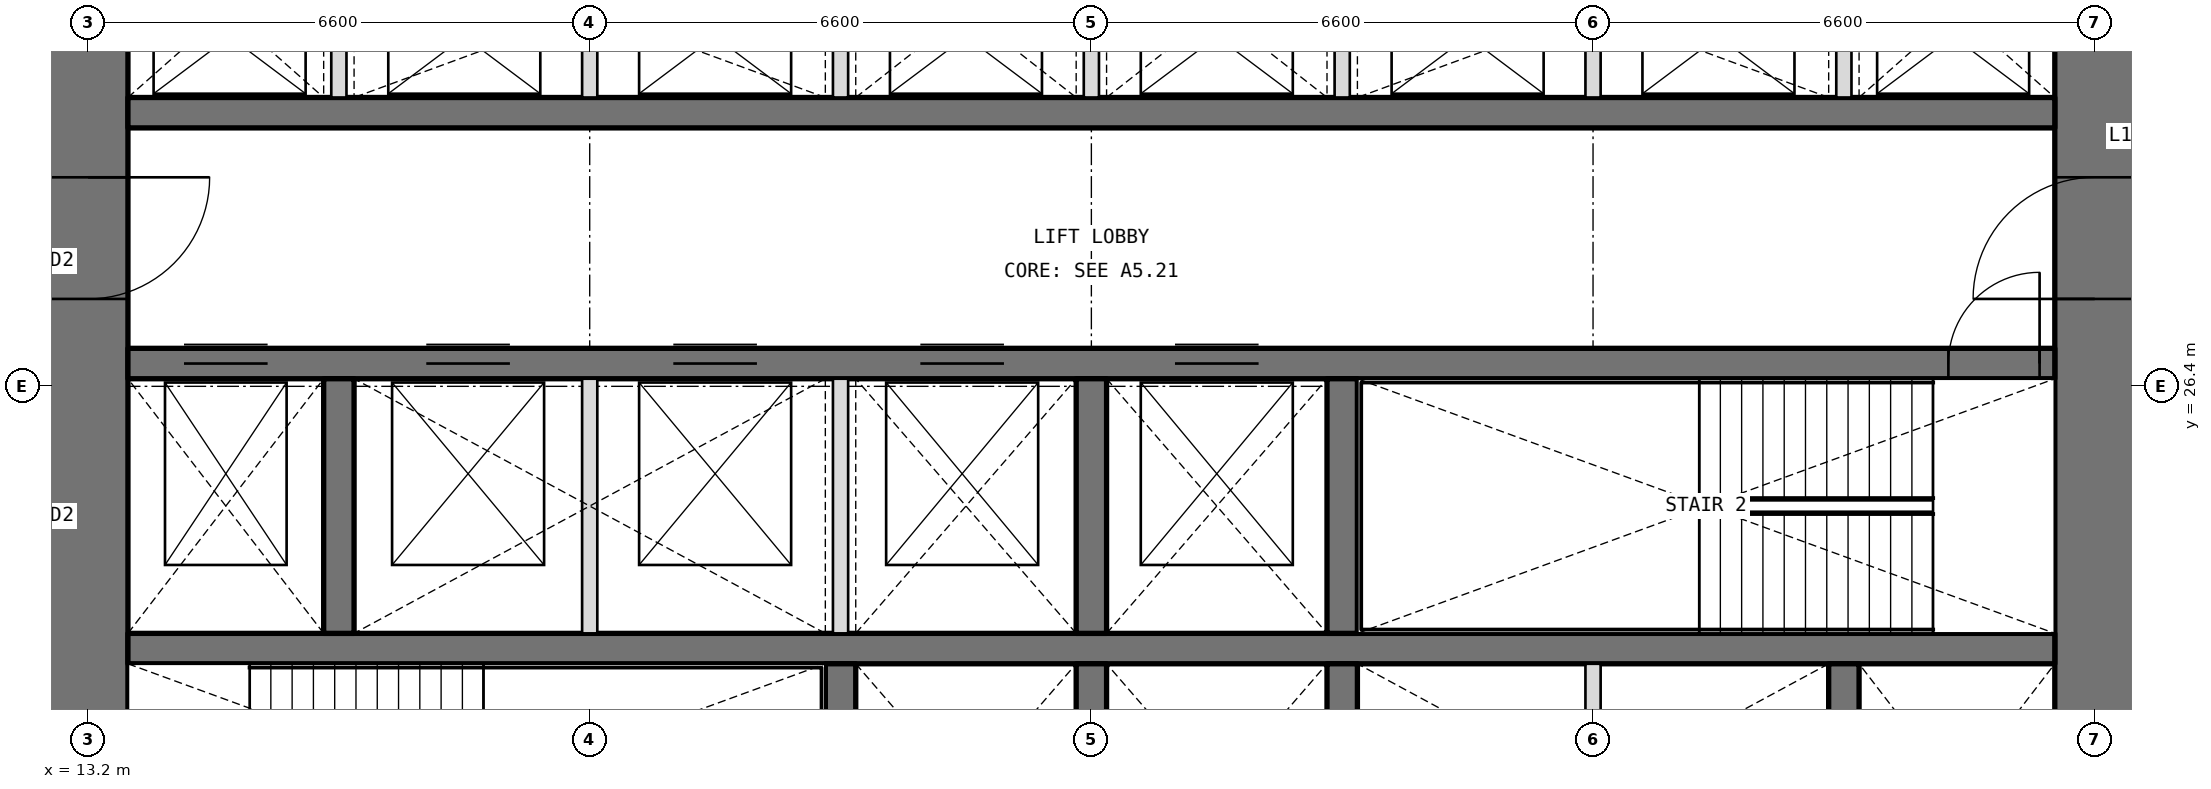
"""IFC4 building model, lengths in metres.
Left out: names, types, materials, properties, quantities, classifications, styles, units other than length and angle.
Written with IfcOpenShell. Run it as: python <this file> out.ifc"""

import sys

from ifc_helpers import new_model, si_unit, direction, frame, frame_2d, origin, place, context, subcontext, project, spatial, rectangle, extrude, element, fill, save


model = new_model("IFC4")
c1 = context("Model", 3, precision=1e-05, world=origin(), true_north=direction((0.0, 1.0)))
c2 = subcontext(c1, "Body", "Model", "MODEL_VIEW")
j1 = project(units=[si_unit("LENGTHUNIT", "METRE"), si_unit("PLANEANGLEUNIT", "RADIAN")], contexts=[c1])
p1 = place(None, origin())
s1 = spatial("IfcSite", under=j1, at=p1, CompositionType="ELEMENT")
p2 = place(p1, origin())
s2 = spatial("IfcBuilding", under=s1, at=p2, CompositionType="ELEMENT")
p3 = place(p2, frame((0.0, 0.0, 86.4)))
s3 = spatial("IfcBuildingStorey", under=s2, at=p3, CompositionType="ELEMENT", Elevation=86.4)
p4 = place(p3, frame((39.6, 13.725, 0.0), z_axis=(0.0, 0.0, 1.0), x_axis=(0.0, 1.0, 0.0)))
e1 = element("IfcWall", 1, at=p4, inside=s3, PredefinedType="SHEAR", context=c2, shape_type="SweptSolid", body=[
    extrude(rectangle(XDim=18.75, YDim=1.05, at=frame_2d((9.375, 0.0))), origin(), (0.0, 0.0, 1.0), 4.2),
])
p5 = place(p4, frame((3.025, 0.0, 0.0)))
e2 = element("IfcOpeningElement", 2, at=p5, cuts=e1, PredefinedType="OPENING", context=c2, shape_type="SweptSolid", body=[
    extrude(rectangle(XDim=1.6, YDim=2.1, at=frame_2d((0.8, 1.05))), frame((0.0, 0.535, 0.0), z_axis=(0.0, -1.0, 0.0), x_axis=(1.0, 0.0, 0.0)), (0.0, 0.0, 1.0), 1.07),
])
p6 = place(p4, frame((13.825, 0.0, 0.0)))
e3 = element("IfcOpeningElement", 3, at=p6, cuts=e1, PredefinedType="OPENING", context=c2, shape_type="SweptSolid", body=[
    extrude(rectangle(XDim=1.6, YDim=2.1, at=frame_2d((0.8, 1.05))), frame((0.0, 0.535, 0.0), z_axis=(0.0, -1.0, 0.0), x_axis=(1.0, 0.0, 0.0)), (0.0, 0.0, 1.0), 1.07),
])
p7 = place(p3, frame((13.2, 32.475, 0.0), z_axis=(0.0, 0.0, 1.0), x_axis=(0.0, -1.0, 0.0)))
e4 = element("IfcWall", 4, at=p7, inside=s3, PredefinedType="SHEAR", context=c2, shape_type="SweptSolid", body=[
    extrude(rectangle(XDim=18.75, YDim=1.05, at=frame_2d((9.375, 0.0))), origin(), (0.0, 0.0, 1.0), 4.2),
])
p8 = place(p7, frame((14.125, 0.0, 0.0)))
e5 = element("IfcOpeningElement", 5, at=p8, cuts=e4, PredefinedType="OPENING", context=c2, shape_type="SweptSolid", body=[
    extrude(rectangle(XDim=1.6, YDim=2.1, at=frame_2d((0.8, 1.05))), frame((0.0, 0.535, 0.0), z_axis=(0.0, -1.0, 0.0), x_axis=(1.0, 0.0, 0.0)), (0.0, 0.0, 1.0), 1.07),
])
p9 = place(p7, frame((3.325, 0.0, 0.0)))
e6 = element("IfcOpeningElement", 6, at=p9, cuts=e4, PredefinedType="OPENING", context=c2, shape_type="SweptSolid", body=[
    extrude(rectangle(XDim=1.6, YDim=2.1, at=frame_2d((0.8, 1.05))), frame((0.0, 0.535, 0.0), z_axis=(0.0, -1.0, 0.0), x_axis=(1.0, 0.0, 0.0)), (0.0, 0.0, 1.0), 1.07),
])
p10 = place(p3, frame((13.725, 22.95, 0.0), z_axis=(0.0, 0.0, 1.0), x_axis=(1.0, 0.0, 0.0)))
e7 = element("IfcWall", 7, at=p10, inside=s3, PredefinedType="SHEAR", context=c2, shape_type="SweptSolid", body=[
    extrude(rectangle(XDim=25.35, YDim=0.4, at=frame_2d((12.675, 0.0))), origin(), (0.0, 0.0, 1.0), 4.2),
])
p11 = place(p3, frame((13.725, 26.7, 0.0), z_axis=(0.0, 0.0, 1.0), x_axis=(1.0, 0.0, 0.0)))
e8 = element("IfcWall", 8, at=p11, inside=s3, PredefinedType="SHEAR", context=c2, shape_type="SweptSolid", body=[
    extrude(rectangle(XDim=25.35, YDim=0.4, at=frame_2d((12.675, 0.0))), origin(), (0.0, 0.0, 1.0), 4.2),
])
p12 = place(p11, frame((23.95, 0.0, 0.0)))
e9 = element("IfcOpeningElement", 9, at=p12, cuts=e8, PredefinedType="OPENING", context=c2, shape_type="SweptSolid", body=[
    extrude(rectangle(XDim=1.2, YDim=2.1, at=frame_2d((0.6, 1.05))), frame((0.0, 0.21, 0.0), z_axis=(0.0, -1.0, 0.0), x_axis=(1.0, 0.0, 0.0)), (0.0, 0.0, 1.0), 0.42),
])
p13 = place(p11, frame((0.738, 0.0, 0.0)))
e10 = element("IfcOpeningElement", 10, at=p13, cuts=e8, PredefinedType="OPENING", context=c2, shape_type="SweptSolid", body=[
    extrude(rectangle(XDim=1.1, YDim=2.1, at=frame_2d((0.55, 1.05))), frame((0.0, 0.21, 0.0), z_axis=(0.0, -1.0, 0.0), x_axis=(1.0, 0.0, 0.0)), (0.0, 0.0, 1.0), 0.42),
])
p14 = place(p11, frame((3.925, 0.0, 0.0)))
e11 = element("IfcOpeningElement", 11, at=p14, cuts=e8, PredefinedType="OPENING", context=c2, shape_type="SweptSolid", body=[
    extrude(rectangle(XDim=1.1, YDim=2.1, at=frame_2d((0.55, 1.05))), frame((0.0, 0.21, 0.0), z_axis=(0.0, -1.0, 0.0), x_axis=(1.0, 0.0, 0.0)), (0.0, 0.0, 1.0), 0.42),
])
p15 = place(p11, frame((7.175, 0.0, 0.0)))
e12 = element("IfcOpeningElement", 12, at=p15, cuts=e8, PredefinedType="OPENING", context=c2, shape_type="SweptSolid", body=[
    extrude(rectangle(XDim=1.1, YDim=2.1, at=frame_2d((0.55, 1.05))), frame((0.0, 0.21, 0.0), z_axis=(0.0, -1.0, 0.0), x_axis=(1.0, 0.0, 0.0)), (0.0, 0.0, 1.0), 0.42),
])
p16 = place(p11, frame((10.425, 0.0, 0.0)))
e13 = element("IfcOpeningElement", 13, at=p16, cuts=e8, PredefinedType="OPENING", context=c2, shape_type="SweptSolid", body=[
    extrude(rectangle(XDim=1.1, YDim=2.1, at=frame_2d((0.55, 1.05))), frame((0.0, 0.21, 0.0), z_axis=(0.0, -1.0, 0.0), x_axis=(1.0, 0.0, 0.0)), (0.0, 0.0, 1.0), 0.42),
])
p17 = place(p11, frame((13.775, 0.0, 0.0)))
e14 = element("IfcOpeningElement", 14, at=p17, cuts=e8, PredefinedType="OPENING", context=c2, shape_type="SweptSolid", body=[
    extrude(rectangle(XDim=1.1, YDim=2.1, at=frame_2d((0.55, 1.05))), frame((0.0, 0.21, 0.0), z_axis=(0.0, -1.0, 0.0), x_axis=(1.0, 0.0, 0.0)), (0.0, 0.0, 1.0), 0.42),
])
p18 = place(p3, frame((13.725, 30.0, 0.0), z_axis=(0.0, 0.0, 1.0), x_axis=(1.0, 0.0, 0.0)))
e15 = element("IfcWall", 15, at=p18, inside=s3, PredefinedType="SHEAR", context=c2, shape_type="SweptSolid", body=[
    extrude(rectangle(XDim=25.35, YDim=0.4, at=frame_2d((12.675, 0.0))), origin(), (0.0, 0.0, 1.0), 4.2),
])
for number, where, z_axis, x_axis in (
    (16, (23.1, 19.4, 0.0), (0.0, 0.0, 1.0), (0.0, 1.0, 0.0)),
    (17, (26.4, 19.4, 0.0), (0.0, 0.0, 1.0), (0.0, 1.0, 0.0)),
    (18, (29.7, 19.4, 0.0), (0.0, 0.0, 1.0), (0.0, 1.0, 0.0)),
    (19, (36.3, 19.4, 0.0), (0.0, 0.0, 1.0), (0.0, 1.0, 0.0)),
    (20, (16.5, 23.15, 0.0), (0.0, 0.0, 1.0), (0.0, 1.0, 0.0)),
    (21, (26.4, 23.15, 0.0), (0.0, 0.0, 1.0), (0.0, 1.0, 0.0)),
    (22, (29.7, 23.15, 0.0), (0.0, 0.0, 1.0), (0.0, 1.0, 0.0)),
):
    element("IfcWall", number, at=place(p3, frame(where, z_axis=z_axis, x_axis=x_axis)), inside=s3, PredefinedType="SHEAR", context=c2, shape_type="SweptSolid", body=[
        extrude(rectangle(XDim=3.35, YDim=0.4, at=frame_2d((1.675, 0.0))), origin(), (0.0, 0.0, 1.0), 4.2),
    ])
for number, where, z_axis, x_axis in (
    (23, (16.5, 30.2, 0.0), (0.0, 0.0, 1.0), (0.0, 1.0, 0.0)),
    (24, (19.8, 30.2, 0.0), (0.0, 0.0, 1.0), (0.0, 1.0, 0.0)),
    (25, (23.1, 30.2, 0.0), (0.0, 0.0, 1.0), (0.0, 1.0, 0.0)),
    (26, (26.4, 30.2, 0.0), (0.0, 0.0, 1.0), (0.0, 1.0, 0.0)),
    (27, (29.7, 30.2, 0.0), (0.0, 0.0, 1.0), (0.0, 1.0, 0.0)),
    (28, (33.0, 30.2, 0.0), (0.0, 0.0, 1.0), (0.0, 1.0, 0.0)),
    (29, (36.3, 30.2, 0.0), (0.0, 0.0, 1.0), (0.0, 1.0, 0.0)),
):
    element("IfcWall", number, at=place(p3, frame(where, z_axis=z_axis, x_axis=x_axis)), inside=s3, PredefinedType="PARTITIONING", context=c2, shape_type="SweptSolid", body=[
        extrude(rectangle(XDim=2.275, YDim=0.2, at=frame_2d((1.138, 0.0))), origin(), (0.0, 0.0, 1.0), 4.2),
    ])
for number, where, z_axis, x_axis in (
    (30, (33.0, 19.4, 0.0), (0.0, 0.0, 1.0), (0.0, 1.0, 0.0)),
    (31, (19.8, 23.15, 0.0), (0.0, 0.0, 1.0), (0.0, 1.0, 0.0)),
    (32, (23.1, 23.15, 0.0), (0.0, 0.0, 1.0), (0.0, 1.0, 0.0)),
):
    element("IfcWall", number, at=place(p3, frame(where, z_axis=z_axis, x_axis=x_axis)), inside=s3, PredefinedType="PARTITIONING", context=c2, shape_type="SweptSolid", body=[
        extrude(rectangle(XDim=3.35, YDim=0.2, at=frame_2d((1.675, 0.0))), origin(), (0.0, 0.0, 1.0), 4.2),
    ])
p19 = place(p12, origin())
e33 = element("IfcDoor", 33, at=p19, inside=s3, OperationType="SINGLE_SWING_RIGHT", PredefinedType="DOOR", context=c2, shape_type="SweptSolid", body=[
    extrude(rectangle(XDim=1.2, YDim=2.1, at=frame_2d((0.6, 1.05))), frame((0.0, 0.025, 0.0), z_axis=(0.0, -1.0, 0.0), x_axis=(1.0, 0.0, 0.0)), (0.0, 0.0, 1.0), 0.05),
])
fill(e9, e33)
p20 = place(p9, origin())
e34 = element("IfcDoor", 34, at=p20, inside=s3, OperationType="DOUBLE_DOOR_DOUBLE_SWING", PredefinedType="DOOR", context=c2, shape_type="SweptSolid", body=[
    extrude(rectangle(XDim=1.6, YDim=2.1, at=frame_2d((0.8, 1.05))), frame((0.0, 0.025, 0.0), z_axis=(0.0, -1.0, 0.0), x_axis=(1.0, 0.0, 0.0)), (0.0, 0.0, 1.0), 0.05),
])
fill(e6, e34)
p21 = place(p6, origin())
e35 = element("IfcDoor", 35, at=p21, inside=s3, OperationType="DOUBLE_DOOR_DOUBLE_SWING", PredefinedType="DOOR", context=c2, shape_type="SweptSolid", body=[
    extrude(rectangle(XDim=1.6, YDim=2.1, at=frame_2d((0.8, 1.05))), frame((0.0, 0.025, 0.0), z_axis=(0.0, -1.0, 0.0), x_axis=(1.0, 0.0, 0.0)), (0.0, 0.0, 1.0), 0.05),
])
fill(e3, e35)
p22 = place(p13, origin())
e36 = element("IfcDoor", 36, at=p22, inside=s3, OperationType="DOUBLE_DOOR_SLIDING", PredefinedType="DOOR", context=c2, shape_type="SweptSolid", body=[
    extrude(rectangle(XDim=1.1, YDim=2.1, at=frame_2d((0.55, 1.05))), frame((0.0, 0.025, 0.0), z_axis=(0.0, -1.0, 0.0), x_axis=(1.0, 0.0, 0.0)), (0.0, 0.0, 1.0), 0.05),
])
fill(e10, e36)
p23 = place(p14, origin())
e37 = element("IfcDoor", 37, at=p23, inside=s3, OperationType="DOUBLE_DOOR_SLIDING", PredefinedType="DOOR", context=c2, shape_type="SweptSolid", body=[
    extrude(rectangle(XDim=1.1, YDim=2.1, at=frame_2d((0.55, 1.05))), frame((0.0, 0.025, 0.0), z_axis=(0.0, -1.0, 0.0), x_axis=(1.0, 0.0, 0.0)), (0.0, 0.0, 1.0), 0.05),
])
fill(e11, e37)
p24 = place(p15, origin())
e38 = element("IfcDoor", 38, at=p24, inside=s3, OperationType="DOUBLE_DOOR_SLIDING", PredefinedType="DOOR", context=c2, shape_type="SweptSolid", body=[
    extrude(rectangle(XDim=1.1, YDim=2.1, at=frame_2d((0.55, 1.05))), frame((0.0, 0.025, 0.0), z_axis=(0.0, -1.0, 0.0), x_axis=(1.0, 0.0, 0.0)), (0.0, 0.0, 1.0), 0.05),
])
fill(e12, e38)
p25 = place(p16, origin())
e39 = element("IfcDoor", 39, at=p25, inside=s3, OperationType="DOUBLE_DOOR_SLIDING", PredefinedType="DOOR", context=c2, shape_type="SweptSolid", body=[
    extrude(rectangle(XDim=1.1, YDim=2.1, at=frame_2d((0.55, 1.05))), frame((0.0, 0.025, 0.0), z_axis=(0.0, -1.0, 0.0), x_axis=(1.0, 0.0, 0.0)), (0.0, 0.0, 1.0), 0.05),
])
fill(e13, e39)
p26 = place(p17, origin())
e40 = element("IfcDoor", 40, at=p26, inside=s3, OperationType="DOUBLE_DOOR_SLIDING", PredefinedType="DOOR", context=c2, shape_type="SweptSolid", body=[
    extrude(rectangle(XDim=1.1, YDim=2.1, at=frame_2d((0.55, 1.05))), frame((0.0, 0.025, 0.0), z_axis=(0.0, -1.0, 0.0), x_axis=(1.0, 0.0, 0.0)), (0.0, 0.0, 1.0), 0.05),
])
fill(e14, e40)
save(model, sys.argv[1])
